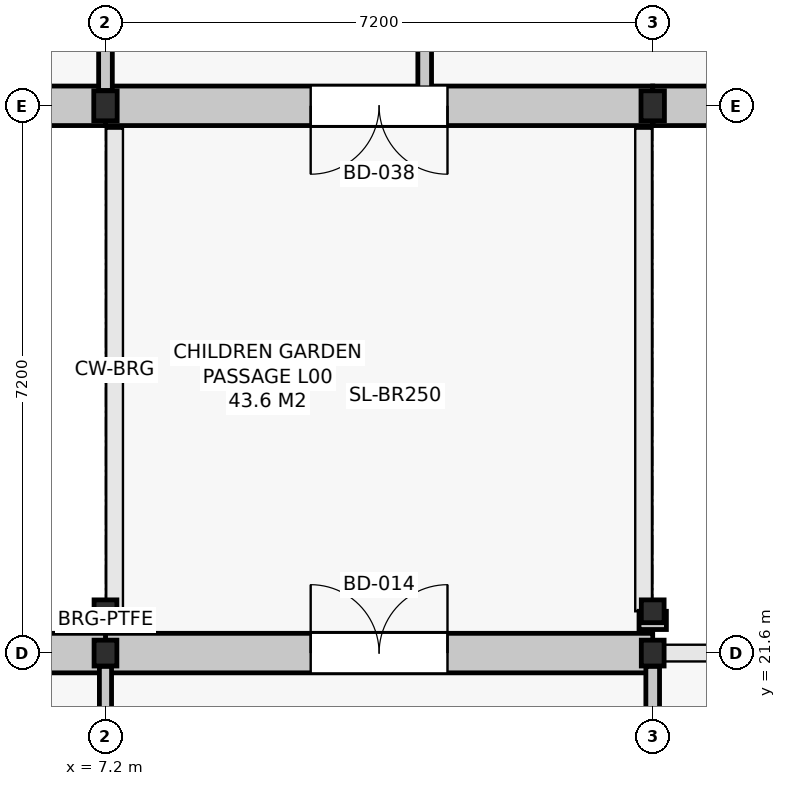
"""IFC4 building model, lengths in metres.
Left out: names, types, materials, properties, quantities, classifications, styles, units other than length and angle.
Written with IfcOpenShell. Run it as: python <this file> out.ifc"""

import sys

from ifc_helpers import new_model, si_unit, direction, frame, frame_2d, origin, origin_2d, place, context, subcontext, project, spatial, rectangle, i_section, extrude, element, fill, save


model = new_model("IFC4")
c1 = context("Model", 3, precision=1e-05, world=origin(), true_north=direction((0.0, 1.0)))
c2 = subcontext(c1, "Body", "Model", "MODEL_VIEW")
j1 = project(units=[si_unit("LENGTHUNIT", "METRE"), si_unit("PLANEANGLEUNIT", "RADIAN")], contexts=[c1])
p1 = place(None, origin())
s1 = spatial("IfcSite", under=j1, at=p1, CompositionType="ELEMENT")
p2 = place(p1, origin())
s2 = spatial("IfcBuilding", under=s1, at=p2, CompositionType="ELEMENT")
p3 = place(p2, origin())
s3 = spatial("IfcBuildingStorey", under=s2, at=p3, CompositionType="ELEMENT", Elevation=0.0)
for number, where, z_axis, x_axis in (
    (1, (7.2, 21.6, 0.0), (0.0, 0.0, 1.0), (1.0, 0.0, 0.0)),
    (2, (14.4, 21.6, 0.0), (0.0, 0.0, 1.0), (1.0, 0.0, 0.0)),
):
    element("IfcColumn", number, at=place(p3, frame(where, z_axis=z_axis, x_axis=x_axis)), inside=s3, PredefinedType="COLUMN", context=c2, shape_type="SweptSolid", body=[
        extrude(i_section(OverallWidth=0.3, OverallDepth=0.34, WebThickness=0.012, FlangeThickness=0.021, FilletRadius=0.027, at=origin_2d()), origin(), (0.0, 0.0, 1.0), 5.4),
    ])
for number, where, z_axis, x_axis in (
    (3, (7.2, 28.8, 0.0), (0.0, 0.0, 1.0), (1.0, 0.0, 0.0)),
    (4, (14.4, 28.8, 0.0), (0.0, 0.0, 1.0), (1.0, 0.0, 0.0)),
):
    element("IfcColumn", number, at=place(p3, frame(where, z_axis=z_axis, x_axis=x_axis)), inside=s3, PredefinedType="COLUMN", context=c2, shape_type="SweptSolid", body=[
        extrude(i_section(OverallWidth=0.308, OverallDepth=0.395, WebThickness=0.021, FlangeThickness=0.036, FilletRadius=0.027, at=origin_2d()), origin(), (0.0, 0.0, 1.0), 5.4),
    ])
for number, where, z_axis, x_axis in (
    (5, (7.2, 22.15, 0.0), (0.0, 0.0, 1.0), (1.0, 0.0, 0.0)),
    (6, (14.4, 22.15, 0.0), (0.0, 0.0, 1.0), (1.0, 0.0, 0.0)),
):
    element("IfcColumn", number, at=place(p3, frame(where, z_axis=z_axis, x_axis=x_axis)), inside=s3, PredefinedType="COLUMN", context=c2, shape_type="SweptSolid", body=[
        extrude(i_section(OverallWidth=0.3, OverallDepth=0.3, WebThickness=0.011, FlangeThickness=0.019, FilletRadius=0.027, at=origin_2d()), origin(), (0.0, 0.0, 1.0), 5.4),
    ])
p4 = place(p3, frame((14.4, 21.6, 0.0), z_axis=(0.0, 0.0, 1.0), x_axis=(-1.0, 0.0, 0.0)))
e7 = element("IfcWall", 7, at=p4, inside=s3, PredefinedType="SOLIDWALL", context=c2, shape_type="SweptSolid", body=[
    extrude(rectangle(XDim=7.2, YDim=0.52, at=frame_2d((3.6, 0.0))), origin(), (0.0, 0.0, 1.0), 4.4),
])
p5 = place(p4, frame((2.7, 0.0, 0.0)))
e8 = element("IfcOpeningElement", 8, at=p5, cuts=e7, PredefinedType="OPENING", context=c2, shape_type="SweptSolid", body=[
    extrude(rectangle(XDim=1.8, YDim=2.3, at=frame_2d((0.9, 1.15))), frame((0.0, 0.272, 0.0), z_axis=(0.0, -1.0, 0.0), x_axis=(1.0, 0.0, 0.0)), (0.0, 0.0, 1.0), 0.544),
])
p6 = place(p3, frame((7.2, 21.6, 0.0), z_axis=(0.0, 0.0, 1.0), x_axis=(-1.0, 0.0, 0.0)))
e9 = element("IfcWall", 9, at=p6, inside=s3, PredefinedType="SOLIDWALL", context=c2, shape_type="SweptSolid", body=[
    extrude(rectangle(XDim=7.046, YDim=0.52, at=frame_2d((3.523, 0.0))), origin(), (0.0, 0.0, 1.0), 4.4),
])
p7 = place(p6, frame((2.55, 0.0, 0.9)))
e10 = element("IfcOpeningElement", 10, at=p7, cuts=e9, PredefinedType="OPENING", context=c2, shape_type="SweptSolid", body=[
    extrude(rectangle(XDim=2.1, YDim=2.1, at=frame_2d((1.05, 1.05))), frame((0.0, 0.272, 0.0), z_axis=(0.0, -1.0, 0.0), x_axis=(1.0, 0.0, 0.0)), (0.0, 0.0, 1.0), 0.544),
])
p8 = place(p3, frame((0.158, 28.8, 0.0), z_axis=(0.0, 0.0, 1.0), x_axis=(1.0, 0.0, 0.0)))
e11 = element("IfcWall", 11, at=p8, inside=s3, PredefinedType="SOLIDWALL", context=c2, shape_type="SweptSolid", body=[
    extrude(rectangle(XDim=7.042, YDim=0.52, at=frame_2d((3.521, 0.0))), origin(), (0.0, 0.0, 1.0), 4.38),
])
p9 = place(p8, frame((2.521, 0.0, 1.65)))
e12 = element("IfcOpeningElement", 12, at=p9, cuts=e11, PredefinedType="OPENING", context=c2, shape_type="SweptSolid", body=[
    extrude(rectangle(XDim=2.0, YDim=0.95, at=frame_2d((1.0, 0.475))), frame((0.0, 0.272, 0.0), z_axis=(0.0, -1.0, 0.0), x_axis=(1.0, 0.0, 0.0)), (0.0, 0.0, 1.0), 0.544),
])
p10 = place(p3, frame((7.2, 28.8, 0.0), z_axis=(0.0, 0.0, 1.0), x_axis=(1.0, 0.0, 0.0)))
e13 = element("IfcWall", 13, at=p10, inside=s3, PredefinedType="SOLIDWALL", context=c2, shape_type="SweptSolid", body=[
    extrude(rectangle(XDim=7.2, YDim=0.52, at=frame_2d((3.6, 0.0))), origin(), (0.0, 0.0, 1.0), 4.38),
])
p11 = place(p10, frame((2.7, 0.0, 0.0)))
e14 = element("IfcOpeningElement", 14, at=p11, cuts=e13, PredefinedType="OPENING", context=c2, shape_type="SweptSolid", body=[
    extrude(rectangle(XDim=1.8, YDim=2.3, at=frame_2d((0.9, 1.15))), frame((0.0, 0.272, 0.0), z_axis=(0.0, -1.0, 0.0), x_axis=(1.0, 0.0, 0.0)), (0.0, 0.0, 1.0), 0.544),
])
p12 = place(p3, frame((14.4, 28.8, 0.0), z_axis=(0.0, 0.0, 1.0), x_axis=(1.0, 0.0, 0.0)))
e15 = element("IfcWall", 15, at=p12, inside=s3, PredefinedType="SOLIDWALL", context=c2, shape_type="SweptSolid", body=[
    extrude(rectangle(XDim=7.042, YDim=0.52, at=frame_2d((3.521, 0.0))), origin(), (0.0, 0.0, 1.0), 4.38),
])
p13 = place(p12, frame((3.0, 0.0, 0.95)))
e16 = element("IfcOpeningElement", 16, at=p13, cuts=e15, PredefinedType="OPENING", context=c2, shape_type="SweptSolid", body=[
    extrude(rectangle(XDim=1.2, YDim=2.15, at=frame_2d((0.6, 1.075))), frame((0.0, 0.272, 0.0), z_axis=(0.0, -1.0, 0.0), x_axis=(1.0, 0.0, 0.0)), (0.0, 0.0, 1.0), 0.544),
])
p14 = place(p3, frame((14.4, 14.574, 0.0), z_axis=(0.0, 0.0, 1.0), x_axis=(0.0, 1.0, 0.0)))
e17 = element("IfcWall", 17, at=p14, inside=s3, PredefinedType="PARTITIONING", context=c2, shape_type="SweptSolid", body=[
    extrude(rectangle(XDim=6.852, YDim=0.18, at=frame_2d((3.426, 0.0))), origin(), (0.0, 0.0, 1.0), 4.665),
])
p15 = place(p3, frame((7.2, 17.877, 0.0), z_axis=(0.0, 0.0, 1.0), x_axis=(0.0, 1.0, 0.0)))
e18 = element("IfcWall", 18, at=p15, inside=s3, PredefinedType="PARTITIONING", context=c2, shape_type="SweptSolid", body=[
    extrude(rectangle(XDim=3.549, YDim=0.16, at=frame_2d((1.774, 0.0))), origin(), (0.0, 0.0, 1.0), 4.665),
])
p16 = place(p15, frame((1.274, 0.0, 0.0)))
e19 = element("IfcOpeningElement", 19, at=p16, cuts=e18, PredefinedType="OPENING", context=c2, shape_type="SweptSolid", body=[
    extrude(rectangle(XDim=1.0, YDim=2.15, at=frame_2d((0.5, 1.075))), frame((0.0, 0.092, 0.0), z_axis=(0.0, -1.0, 0.0), x_axis=(1.0, 0.0, 0.0)), (0.0, 0.0, 1.0), 0.184),
])
p17 = place(p3, frame((7.2, 29.001, 0.0), z_axis=(0.0, 0.0, 1.0), x_axis=(0.0, 1.0, 0.0)))
e20 = element("IfcWall", 20, at=p17, inside=s3, PredefinedType="PARTITIONING", context=c2, shape_type="SweptSolid", body=[
    extrude(rectangle(XDim=6.708, YDim=0.18, at=frame_2d((3.354, 0.0))), origin(), (0.0, 0.0, 1.0), 4.495),
])
p18 = place(p17, frame((2.879, 0.0, 0.0)))
e21 = element("IfcOpeningElement", 21, at=p18, cuts=e20, PredefinedType="OPENING", context=c2, shape_type="SweptSolid", body=[
    extrude(rectangle(XDim=0.95, YDim=2.15, at=frame_2d((0.475, 1.075))), frame((0.0, 0.102, 0.0), z_axis=(0.0, -1.0, 0.0), x_axis=(1.0, 0.0, 0.0)), (0.0, 0.0, 1.0), 0.204),
])
p19 = place(p3, frame((11.4, 28.855, 0.0), z_axis=(0.0, 0.0, 1.0), x_axis=(0.0, 1.0, 0.0)))
e22 = element("IfcWall", 22, at=p19, inside=s3, PredefinedType="PARTITIONING", context=c2, shape_type="SweptSolid", body=[
    extrude(rectangle(XDim=21.453, YDim=0.18, at=frame_2d((10.727, 0.0))), origin(), (0.0, 0.0, 1.0), 4.485),
])
p20 = place(p19, frame((9.902, 0.0, 0.0)))
e23 = element("IfcOpeningElement", 23, at=p20, cuts=e22, PredefinedType="OPENING", context=c2, shape_type="SweptSolid", body=[
    extrude(rectangle(XDim=1.65, YDim=2.25, at=frame_2d((0.825, 1.125))), frame((0.0, 0.102, 0.0), z_axis=(0.0, -1.0, 0.0), x_axis=(1.0, 0.0, 0.0)), (0.0, 0.0, 1.0), 0.204),
])
p21 = place(p5, frame((1.8, 0.0, 0.0), z_axis=(0.0, 0.0, 1.0), x_axis=(-1.0, 0.0, 0.0)))
e24 = element("IfcDoor", 24, at=p21, inside=s3, OperationType="DOUBLE_DOOR_SINGLE_SWING", PredefinedType="DOOR", context=c2, shape_type="SweptSolid", body=[
    extrude(rectangle(XDim=1.8, YDim=2.3, at=frame_2d((0.9, 1.15))), frame((0.0, 0.025, 0.0), z_axis=(0.0, -1.0, 0.0), x_axis=(1.0, 0.0, 0.0)), (0.0, 0.0, 1.0), 0.05),
])
fill(e8, e24)
p22 = place(p11, frame((1.8, 0.0, 0.0), z_axis=(0.0, 0.0, 1.0), x_axis=(-1.0, 0.0, 0.0)))
e25 = element("IfcDoor", 25, at=p22, inside=s3, OperationType="DOUBLE_DOOR_SINGLE_SWING", PredefinedType="DOOR", context=c2, shape_type="SweptSolid", body=[
    extrude(rectangle(XDim=1.8, YDim=2.3, at=frame_2d((0.9, 1.15))), frame((0.0, 0.025, 0.0), z_axis=(0.0, -1.0, 0.0), x_axis=(1.0, 0.0, 0.0)), (0.0, 0.0, 1.0), 0.05),
])
fill(e14, e25)
save(model, sys.argv[1])
